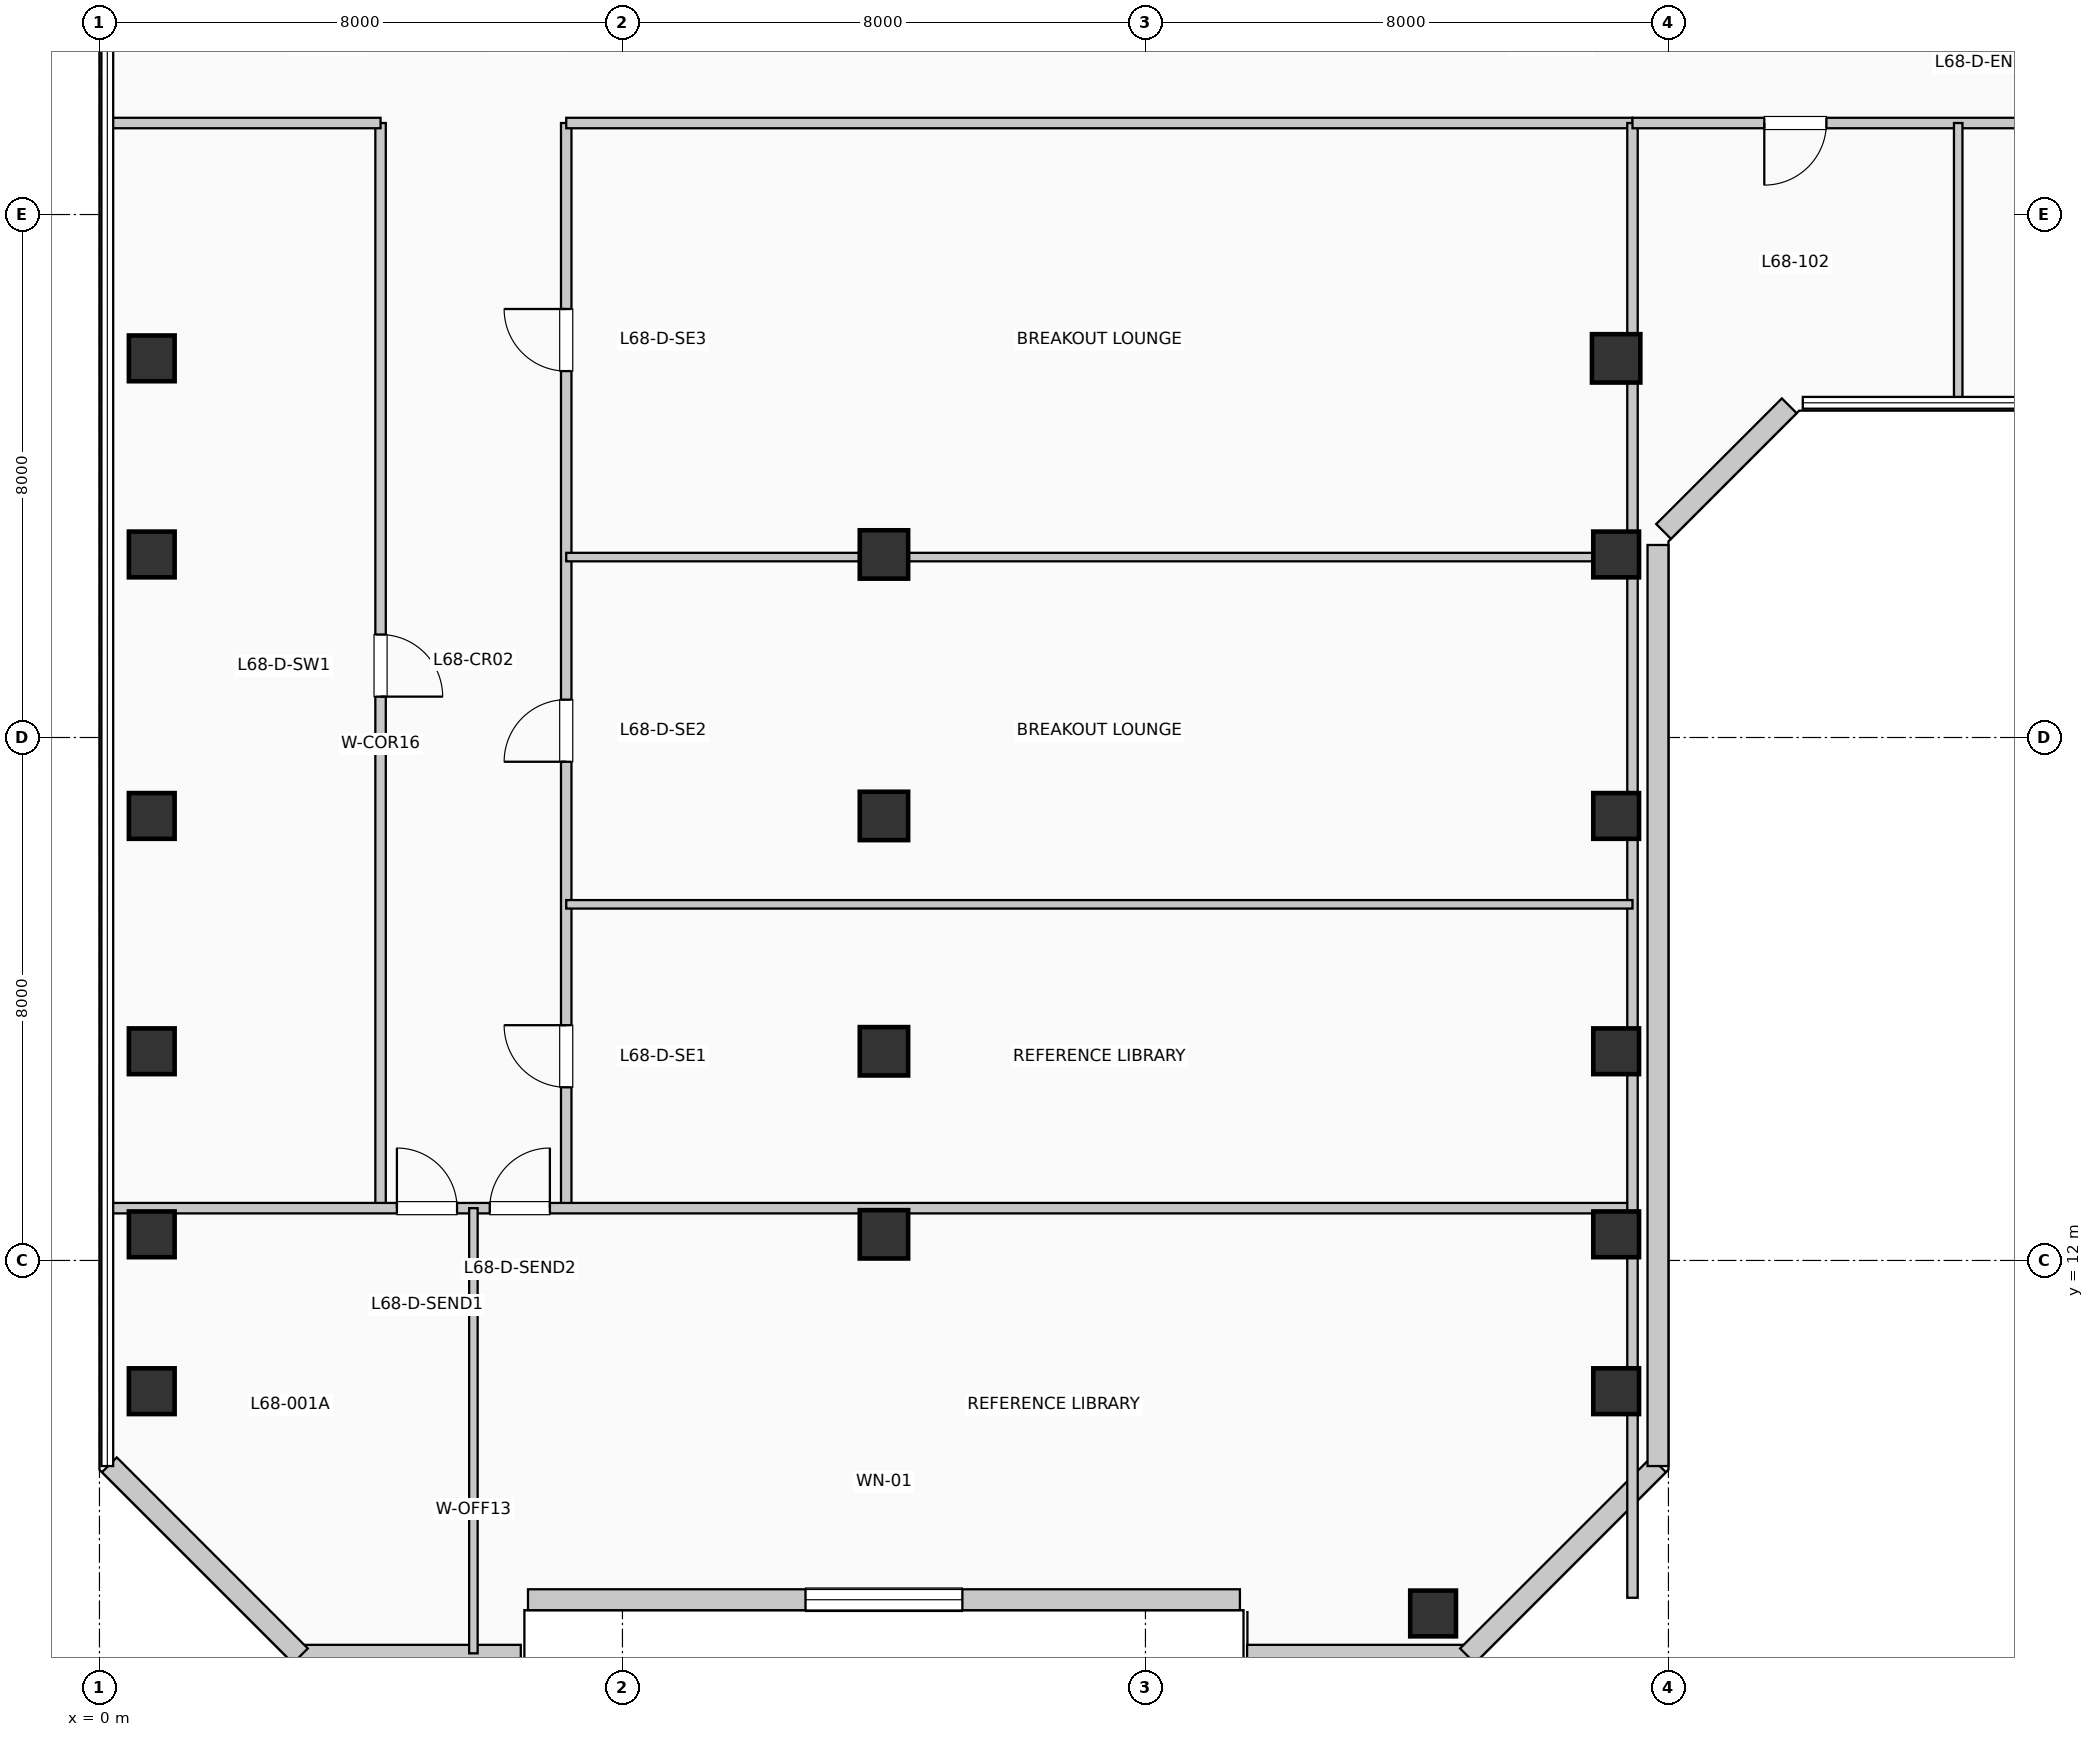
"""IFC4 building model, lengths in metres.
Left out: names, types, materials, properties, quantities, classifications, styles, units other than length and angle.
Written with IfcOpenShell. Run it as: python <this file> out.ifc"""

import sys

from ifc_helpers import new_model, si_unit, direction, frame, frame_2d, origin, origin_2d, place, context, subcontext, project, spatial, rectangle, extrude, element, fill, save


model = new_model("IFC4")
c1 = context("Model", 3, precision=1e-05, world=origin(), true_north=direction((0.0, 1.0)))
c2 = subcontext(c1, "Body", "Model", "MODEL_VIEW")
j1 = project(units=[si_unit("LENGTHUNIT", "METRE"), si_unit("PLANEANGLEUNIT", "RADIAN")], contexts=[c1])
p1 = place(None, origin())
s1 = spatial("IfcSite", under=j1, at=p1, CompositionType="ELEMENT")
p2 = place(p1, origin())
s2 = spatial("IfcBuilding", under=s1, at=p2, CompositionType="ELEMENT")
p3 = place(p2, frame((0.0, 0.0, 280.17)))
s3 = spatial("IfcBuildingStorey", under=s2, at=p3, CompositionType="ELEMENT", Elevation=280.17)
for number, where, z_axis, x_axis in (
    (1, (0.8, 10.0, 0.0), (0.0, 0.0, 1.0), (1.0, 0.0, 0.0)),
    (2, (0.8, 12.4, 0.0), (0.0, 0.0, 1.0), (1.0, 0.0, 0.0)),
    (3, (0.8, 15.2, 0.0), (0.0, 0.0, 1.0), (1.0, 0.0, 0.0)),
    (4, (0.8, 18.8, 0.0), (0.0, 0.0, 1.0), (1.0, 0.0, 0.0)),
    (5, (0.8, 22.8, 0.0), (0.0, 0.0, 1.0), (1.0, 0.0, 0.0)),
    (6, (0.8, 25.8, 0.0), (0.0, 0.0, 1.0), (1.0, 0.0, 0.0)),
):
    element("IfcColumn", number, at=place(p3, frame(where, z_axis=z_axis, x_axis=x_axis)), inside=s3, PredefinedType="COLUMN", context=c2, shape_type="SweptSolid", body=[
        extrude(rectangle(XDim=0.7, YDim=0.7, at=origin_2d()), origin(), (0.0, 0.0, 1.0), 3.96),
    ])
for number, where, z_axis, x_axis in (
    (7, (12.0, 12.4, 0.0), (0.0, 0.0, 1.0), (1.0, 0.0, 0.0)),
    (8, (12.0, 15.2, 0.0), (0.0, 0.0, 1.0), (1.0, 0.0, 0.0)),
    (9, (12.0, 18.8, 0.0), (0.0, 0.0, 1.0), (1.0, 0.0, 0.0)),
    (10, (12.0, 22.8, 0.0), (0.0, 0.0, 1.0), (1.0, 0.0, 0.0)),
):
    element("IfcColumn", number, at=place(p3, frame(where, z_axis=z_axis, x_axis=x_axis)), inside=s3, PredefinedType="COLUMN", context=c2, shape_type="SweptSolid", body=[
        extrude(rectangle(XDim=0.74, YDim=0.74, at=origin_2d()), origin(), (0.0, 0.0, 1.0), 3.96),
    ])
for number, where, z_axis, x_axis in (
    (11, (20.4, 6.6, 0.0), (0.0, 0.0, 1.0), (1.0, 0.0, 0.0)),
    (12, (23.2, 10.0, 0.0), (0.0, 0.0, 1.0), (1.0, 0.0, 0.0)),
    (13, (23.2, 12.4, 0.0), (0.0, 0.0, 1.0), (1.0, 0.0, 0.0)),
    (14, (23.2, 15.2, 0.0), (0.0, 0.0, 1.0), (1.0, 0.0, 0.0)),
    (15, (23.2, 18.8, 0.0), (0.0, 0.0, 1.0), (1.0, 0.0, 0.0)),
    (16, (23.2, 22.8, 0.0), (0.0, 0.0, 1.0), (1.0, 0.0, 0.0)),
):
    element("IfcColumn", number, at=place(p3, frame(where, z_axis=z_axis, x_axis=x_axis)), inside=s3, PredefinedType="COLUMN", context=c2, shape_type="SweptSolid", body=[
        extrude(rectangle(XDim=0.7, YDim=0.7, at=origin_2d()), origin(), (0.0, 0.0, 1.0), 3.96),
    ])
p4 = place(p3, frame((23.2, 25.8, 0.0), z_axis=(0.0, 0.0, 1.0), x_axis=(1.0, 0.0, 0.0)))
e17 = element("IfcColumn", 17, at=p4, inside=s3, PredefinedType="COLUMN", context=c2, shape_type="SweptSolid", body=[
    extrude(rectangle(XDim=0.74, YDim=0.74, at=origin_2d()), origin(), (0.0, 0.0, 1.0), 3.96),
])
p5 = place(p3, frame((3.055, 5.96, 0.0), z_axis=(0.0, 0.0, 1.0), x_axis=(1.0, 0.0, 0.0)))
e18 = element("IfcWall", 18, at=p5, inside=s3, PredefinedType="SOLIDWALL", context=c2, shape_type="SweptSolid", body=[
    extrude(rectangle(XDim=3.39, YDim=0.32, at=frame_2d((1.695, 0.0))), origin(), (0.0, 0.0, 1.0), 3.74),
])
p6 = place(p3, frame((6.555, 6.81, 0.0), z_axis=(0.0, 0.0, 1.0), x_axis=(1.0, 0.0, 0.0)))
e19 = element("IfcWall", 19, at=p6, inside=s3, PredefinedType="SOLIDWALL", context=c2, shape_type="SweptSolid", body=[
    extrude(rectangle(XDim=10.89, YDim=0.32, at=frame_2d((5.445, 0.0))), origin(), (0.0, 0.0, 1.0), 3.74),
])
p7 = place(p6, frame((4.245, 0.0, 0.85)))
e20 = element("IfcOpeningElement", 20, at=p7, cuts=e19, PredefinedType="OPENING", context=c2, shape_type="SweptSolid", body=[
    extrude(rectangle(XDim=2.4, YDim=2.05, at=frame_2d((1.2, 1.025))), frame((0.0, 0.17, 0.0), z_axis=(0.0, -1.0, 0.0), x_axis=(1.0, 0.0, 0.0)), (0.0, 0.0, 1.0), 0.34),
])
p8 = place(p3, frame((17.555, 5.96, 0.0), z_axis=(0.0, 0.0, 1.0), x_axis=(1.0, 0.0, 0.0)))
e21 = element("IfcWall", 21, at=p8, inside=s3, PredefinedType="SOLIDWALL", context=c2, shape_type="SweptSolid", body=[
    extrude(rectangle(XDim=3.39, YDim=0.32, at=frame_2d((1.695, 0.0))), origin(), (0.0, 0.0, 1.0), 3.74),
])
p9 = place(p3, frame((20.926, 5.952, 0.0), z_axis=(0.0, 0.0, 1.0), x_axis=(0.707077242712, 0.707136318428, 0.0)))
e22 = element("IfcWall", 22, at=p9, inside=s3, PredefinedType="SOLIDWALL", context=c2, shape_type="SweptSolid", body=[
    extrude(rectangle(XDim=4.133, YDim=0.32, at=frame_2d((2.066, 0.0))), origin(), (0.0, 0.0, 1.0), 3.74),
])
p10 = place(p3, frame((23.84, 8.855, 0.0), z_axis=(0.0, 0.0, 1.0), x_axis=(0.0, 1.0, 0.0)))
e23 = element("IfcWall", 23, at=p10, inside=s3, PredefinedType="SOLIDWALL", context=c2, shape_type="SweptSolid", body=[
    extrude(rectangle(XDim=14.09, YDim=0.32, at=frame_2d((7.045, 0.0))), origin(), (0.0, 0.0, 1.0), 3.74),
])
p11 = place(p3, frame((23.926, 23.152, 0.0), z_axis=(0.0, 0.0, 1.0), x_axis=(0.707106781187, 0.707106781187, 0.0)))
e24 = element("IfcWall", 24, at=p11, inside=s3, PredefinedType="SOLIDWALL", context=c2, shape_type="SweptSolid", body=[
    extrude(rectangle(XDim=2.718, YDim=0.32, at=frame_2d((1.359, 0.0))), origin(), (0.0, 0.0, 1.0), 3.74),
])
p12 = place(p3, frame((0.152, 8.874, 0.0), z_axis=(0.0, 0.0, 1.0), x_axis=(0.707077242712, -0.707136318428, 0.0)))
e25 = element("IfcWall", 25, at=p12, inside=s3, PredefinedType="SOLIDWALL", context=c2, shape_type="SweptSolid", body=[
    extrude(rectangle(XDim=4.133, YDim=0.32, at=frame_2d((2.066, 0.0))), origin(), (0.0, 0.0, 1.0), 3.74),
])
p13 = place(p3, frame((4.3, 12.8, 0.0), z_axis=(0.0, 0.0, 1.0), x_axis=(0.0, 1.0, 0.0)))
e26 = element("IfcWall", 26, at=p13, inside=s3, PredefinedType="PARTITIONING", context=c2, shape_type="SweptSolid", body=[
    extrude(rectangle(XDim=16.6, YDim=0.16, at=frame_2d((8.3, 0.0))), origin(), (0.0, 0.0, 1.0), 3.74),
])
p14 = place(p13, frame((8.775, 0.0, 0.0), z_axis=(0.0, 0.0, 1.0), x_axis=(-1.0, 0.0, 0.0)))
e27 = element("IfcOpeningElement", 27, at=p14, cuts=e26, PredefinedType="OPENING", context=c2, shape_type="SweptSolid", body=[
    extrude(rectangle(XDim=0.95, YDim=2.15, at=frame_2d((0.475, 1.075))), frame((0.0, 0.09, 0.0), z_axis=(0.0, -1.0, 0.0), x_axis=(1.0, 0.0, 0.0)), (0.0, 0.0, 1.0), 0.18),
])
p15 = place(p3, frame((7.14, 12.8, 0.0), z_axis=(0.0, 0.0, 1.0), x_axis=(0.0, 1.0, 0.0)))
e28 = element("IfcWall", 28, at=p15, inside=s3, PredefinedType="PARTITIONING", context=c2, shape_type="SweptSolid", body=[
    extrude(rectangle(XDim=16.6, YDim=0.16, at=frame_2d((8.3, 0.0))), origin(), (0.0, 0.0, 1.0), 3.74),
])
p16 = place(p15, frame((1.849, 0.0, 0.0)))
e29 = element("IfcOpeningElement", 29, at=p16, cuts=e28, PredefinedType="OPENING", context=c2, shape_type="SweptSolid", body=[
    extrude(rectangle(XDim=0.95, YDim=2.15, at=frame_2d((0.475, 1.075))), frame((0.0, 0.09, 0.0), z_axis=(0.0, -1.0, 0.0), x_axis=(1.0, 0.0, 0.0)), (0.0, 0.0, 1.0), 0.18),
])
p17 = place(p15, frame((6.829, 0.0, 0.0)))
e30 = element("IfcOpeningElement", 30, at=p17, cuts=e28, PredefinedType="OPENING", context=c2, shape_type="SweptSolid", body=[
    extrude(rectangle(XDim=0.95, YDim=2.15, at=frame_2d((0.475, 1.075))), frame((0.0, 0.09, 0.0), z_axis=(0.0, -1.0, 0.0), x_axis=(1.0, 0.0, 0.0)), (0.0, 0.0, 1.0), 0.18),
])
p18 = place(p15, frame((12.805, 0.0, 0.0)))
e31 = element("IfcOpeningElement", 31, at=p18, cuts=e28, PredefinedType="OPENING", context=c2, shape_type="SweptSolid", body=[
    extrude(rectangle(XDim=0.95, YDim=2.15, at=frame_2d((0.475, 1.075))), frame((0.0, 0.09, 0.0), z_axis=(0.0, -1.0, 0.0), x_axis=(1.0, 0.0, 0.0)), (0.0, 0.0, 1.0), 0.18),
])
p19 = place(p3, frame((0.19, 12.8, 0.0), z_axis=(0.0, 0.0, 1.0), x_axis=(1.0, 0.0, 0.0)))
e32 = element("IfcWall", 32, at=p19, inside=s3, PredefinedType="PARTITIONING", context=c2, shape_type="SweptSolid", body=[
    extrude(rectangle(XDim=23.26, YDim=0.16, at=frame_2d((11.63, 0.0))), origin(), (0.0, 0.0, 1.0), 3.175),
])
p20 = place(p19, frame((4.36, 0.0, 0.0)))
e33 = element("IfcOpeningElement", 33, at=p20, cuts=e32, PredefinedType="OPENING", context=c2, shape_type="SweptSolid", body=[
    extrude(rectangle(XDim=0.92, YDim=2.1, at=frame_2d((0.46, 1.05))), frame((0.0, 0.09, 0.0), z_axis=(0.0, -1.0, 0.0), x_axis=(1.0, 0.0, 0.0)), (0.0, 0.0, 1.0), 0.18),
])
p21 = place(p19, frame((5.78, 0.0, 0.0)))
e34 = element("IfcOpeningElement", 34, at=p21, cuts=e32, PredefinedType="OPENING", context=c2, shape_type="SweptSolid", body=[
    extrude(rectangle(XDim=0.92, YDim=2.1, at=frame_2d((0.46, 1.05))), frame((0.0, 0.09, 0.0), z_axis=(0.0, -1.0, 0.0), x_axis=(1.0, 0.0, 0.0)), (0.0, 0.0, 1.0), 0.18),
])
p22 = place(p3, frame((0.19, 29.4, 0.0), z_axis=(0.0, 0.0, 1.0), x_axis=(1.0, 0.0, 0.0)))
e35 = element("IfcWall", 35, at=p22, inside=s3, PredefinedType="PARTITIONING", context=c2, shape_type="SweptSolid", body=[
    extrude(rectangle(XDim=4.11, YDim=0.16, at=frame_2d((2.055, 0.0))), origin(), (0.0, 0.0, 1.0), 3.425),
])
p23 = place(p3, frame((7.14, 29.4, 0.0), z_axis=(0.0, 0.0, 1.0), x_axis=(1.0, 0.0, 0.0)))
e36 = element("IfcWall", 36, at=p23, inside=s3, PredefinedType="PARTITIONING", context=c2, shape_type="SweptSolid", body=[
    extrude(rectangle(XDim=16.31, YDim=0.16, at=frame_2d((8.155, 0.0))), origin(), (0.0, 0.0, 1.0), 3.425),
])
p24 = place(p3, frame((23.45, 6.84, 0.0), z_axis=(0.0, 0.0, 1.0), x_axis=(0.0, 1.0, 0.0)))
e37 = element("IfcWall", 37, at=p24, inside=s3, PredefinedType="PARTITIONING", context=c2, shape_type="SweptSolid", body=[
    extrude(rectangle(XDim=22.56, YDim=0.16, at=frame_2d((11.28, 0.0))), origin(), (0.0, 0.0, 1.0), 3.175),
])
p25 = place(p3, frame((5.72, 5.99, 0.0), z_axis=(0.0, 0.0, 1.0), x_axis=(0.0, 1.0, 0.0)))
e38 = element("IfcWall", 38, at=p25, inside=s3, PredefinedType="PARTITIONING", context=c2, shape_type="SweptSolid", body=[
    extrude(rectangle(XDim=6.81, YDim=0.13, at=frame_2d((3.405, 0.0))), origin(), (0.0, 0.0, 1.0), 3.74),
])
p26 = place(p3, frame((7.14, 17.448, 0.0), z_axis=(0.0, 0.0, 1.0), x_axis=(1.0, 0.0, 0.0)))
e39 = element("IfcWall", 39, at=p26, inside=s3, PredefinedType="PARTITIONING", context=c2, shape_type="SweptSolid", body=[
    extrude(rectangle(XDim=16.31, YDim=0.13, at=frame_2d((8.155, 0.0))), origin(), (0.0, 0.0, 1.0), 3.74),
])
p27 = place(p3, frame((7.14, 22.76, 0.0), z_axis=(0.0, 0.0, 1.0), x_axis=(1.0, 0.0, 0.0)))
e40 = element("IfcWall", 40, at=p27, inside=s3, PredefinedType="PARTITIONING", context=c2, shape_type="SweptSolid", body=[
    extrude(rectangle(XDim=16.31, YDim=0.13, at=frame_2d((8.155, 0.0))), origin(), (0.0, 0.0, 1.0), 3.175),
])
p28 = place(p3, frame((23.45, 29.4, 0.0), z_axis=(0.0, 0.0, 1.0), x_axis=(1.0, 0.0, 0.0)))
e41 = element("IfcWall", 41, at=p28, inside=s3, PredefinedType="PARTITIONING", context=c2, shape_type="SweptSolid", body=[
    extrude(rectangle(XDim=20.76, YDim=0.16, at=frame_2d((10.38, 0.0))), origin(), (0.0, 0.0, 1.0), 3.425),
])
p29 = place(p28, frame((2.966, 0.0, 0.0), z_axis=(0.0, 0.0, 1.0), x_axis=(-1.0, 0.0, 0.0)))
e42 = element("IfcOpeningElement", 42, at=p29, cuts=e41, PredefinedType="OPENING", context=c2, shape_type="SweptSolid", body=[
    extrude(rectangle(XDim=0.95, YDim=2.15, at=frame_2d((0.475, 1.075))), frame((0.0, 0.09, 0.0), z_axis=(0.0, -1.0, 0.0), x_axis=(1.0, 0.0, 0.0)), (0.0, 0.0, 1.0), 0.18),
])
p30 = place(p28, frame((8.364, 0.0, 0.0), z_axis=(0.0, 0.0, 1.0), x_axis=(-1.0, 0.0, 0.0)))
e43 = element("IfcOpeningElement", 43, at=p30, cuts=e41, PredefinedType="OPENING", context=c2, shape_type="SweptSolid", body=[
    extrude(rectangle(XDim=0.95, YDim=2.15, at=frame_2d((0.475, 1.075))), frame((0.0, 0.09, 0.0), z_axis=(0.0, -1.0, 0.0), x_axis=(1.0, 0.0, 0.0)), (0.0, 0.0, 1.0), 0.18),
])
p31 = place(p28, frame((14.177, 0.0, 0.0), z_axis=(0.0, 0.0, 1.0), x_axis=(-1.0, 0.0, 0.0)))
e44 = element("IfcOpeningElement", 44, at=p31, cuts=e41, PredefinedType="OPENING", context=c2, shape_type="SweptSolid", body=[
    extrude(rectangle(XDim=0.95, YDim=2.15, at=frame_2d((0.475, 1.075))), frame((0.0, 0.09, 0.0), z_axis=(0.0, -1.0, 0.0), x_axis=(1.0, 0.0, 0.0)), (0.0, 0.0, 1.0), 0.18),
])
p32 = place(p28, frame((19.159, 0.0, 0.0), z_axis=(0.0, 0.0, 1.0), x_axis=(-1.0, 0.0, 0.0)))
e45 = element("IfcOpeningElement", 45, at=p32, cuts=e41, PredefinedType="OPENING", context=c2, shape_type="SweptSolid", body=[
    extrude(rectangle(XDim=0.95, YDim=2.15, at=frame_2d((0.475, 1.075))), frame((0.0, 0.09, 0.0), z_axis=(0.0, -1.0, 0.0), x_axis=(1.0, 0.0, 0.0)), (0.0, 0.0, 1.0), 0.18),
])
p33 = place(p3, frame((28.432, 25.19, 0.0), z_axis=(0.0, 0.0, 1.0), x_axis=(0.0, 1.0, 0.0)))
e46 = element("IfcWall", 46, at=p33, inside=s3, PredefinedType="PARTITIONING", context=c2, shape_type="SweptSolid", body=[
    extrude(rectangle(XDim=4.21, YDim=0.13, at=frame_2d((2.105, 0.0))), origin(), (0.0, 0.0, 1.0), 3.74),
])
p34 = place(p7, origin())
e47 = element("IfcWindow", 47, at=p34, inside=s3, PartitioningType="SINGLE_PANEL", PredefinedType="WINDOW", context=c2, shape_type="SweptSolid", body=[
    extrude(rectangle(XDim=2.4, YDim=2.05, at=frame_2d((1.2, 1.025))), frame((0.0, 0.03, 0.0), z_axis=(0.0, -1.0, 0.0), x_axis=(1.0, 0.0, 0.0)), (0.0, 0.0, 1.0), 0.06),
])
fill(e20, e47)
p35 = place(p20, origin())
e48 = element("IfcDoor", 48, at=p35, inside=s3, OperationType="SINGLE_SWING_LEFT", PredefinedType="DOOR", context=c2, shape_type="SweptSolid", body=[
    extrude(rectangle(XDim=0.92, YDim=2.1, at=frame_2d((0.46, 1.05))), frame((0.0, 0.025, 0.0), z_axis=(0.0, -1.0, 0.0), x_axis=(1.0, 0.0, 0.0)), (0.0, 0.0, 1.0), 0.05),
])
fill(e33, e48)
p36 = place(p21, origin())
e49 = element("IfcDoor", 49, at=p36, inside=s3, OperationType="SINGLE_SWING_RIGHT", PredefinedType="DOOR", context=c2, shape_type="SweptSolid", body=[
    extrude(rectangle(XDim=0.92, YDim=2.1, at=frame_2d((0.46, 1.05))), frame((0.0, 0.025, 0.0), z_axis=(0.0, -1.0, 0.0), x_axis=(1.0, 0.0, 0.0)), (0.0, 0.0, 1.0), 0.05),
])
fill(e34, e49)
p37 = place(p14, origin())
e50 = element("IfcDoor", 50, at=p37, inside=s3, OperationType="SINGLE_SWING_LEFT", PredefinedType="DOOR", context=c2, shape_type="SweptSolid", body=[
    extrude(rectangle(XDim=0.95, YDim=2.15, at=frame_2d((0.475, 1.075))), frame((0.0, 0.025, 0.0), z_axis=(0.0, -1.0, 0.0), x_axis=(1.0, 0.0, 0.0)), (0.0, 0.0, 1.0), 0.05),
])
fill(e27, e50)
p38 = place(p16, origin())
e51 = element("IfcDoor", 51, at=p38, inside=s3, OperationType="SINGLE_SWING_RIGHT", PredefinedType="DOOR", context=c2, shape_type="SweptSolid", body=[
    extrude(rectangle(XDim=0.95, YDim=2.15, at=frame_2d((0.475, 1.075))), frame((0.0, 0.025, 0.0), z_axis=(0.0, -1.0, 0.0), x_axis=(1.0, 0.0, 0.0)), (0.0, 0.0, 1.0), 0.05),
])
fill(e29, e51)
p39 = place(p17, origin())
e52 = element("IfcDoor", 52, at=p39, inside=s3, OperationType="SINGLE_SWING_LEFT", PredefinedType="DOOR", context=c2, shape_type="SweptSolid", body=[
    extrude(rectangle(XDim=0.95, YDim=2.15, at=frame_2d((0.475, 1.075))), frame((0.0, 0.025, 0.0), z_axis=(0.0, -1.0, 0.0), x_axis=(1.0, 0.0, 0.0)), (0.0, 0.0, 1.0), 0.05),
])
fill(e30, e52)
p40 = place(p18, origin())
e53 = element("IfcDoor", 53, at=p40, inside=s3, OperationType="SINGLE_SWING_RIGHT", PredefinedType="DOOR", context=c2, shape_type="SweptSolid", body=[
    extrude(rectangle(XDim=0.95, YDim=2.15, at=frame_2d((0.475, 1.075))), frame((0.0, 0.025, 0.0), z_axis=(0.0, -1.0, 0.0), x_axis=(1.0, 0.0, 0.0)), (0.0, 0.0, 1.0), 0.05),
])
fill(e31, e53)
p41 = place(p29, origin())
e54 = element("IfcDoor", 54, at=p41, inside=s3, OperationType="SINGLE_SWING_LEFT", PredefinedType="DOOR", context=c2, shape_type="SweptSolid", body=[
    extrude(rectangle(XDim=0.95, YDim=2.15, at=frame_2d((0.475, 1.075))), frame((0.0, 0.025, 0.0), z_axis=(0.0, -1.0, 0.0), x_axis=(1.0, 0.0, 0.0)), (0.0, 0.0, 1.0), 0.05),
])
fill(e42, e54)
save(model, sys.argv[1])
